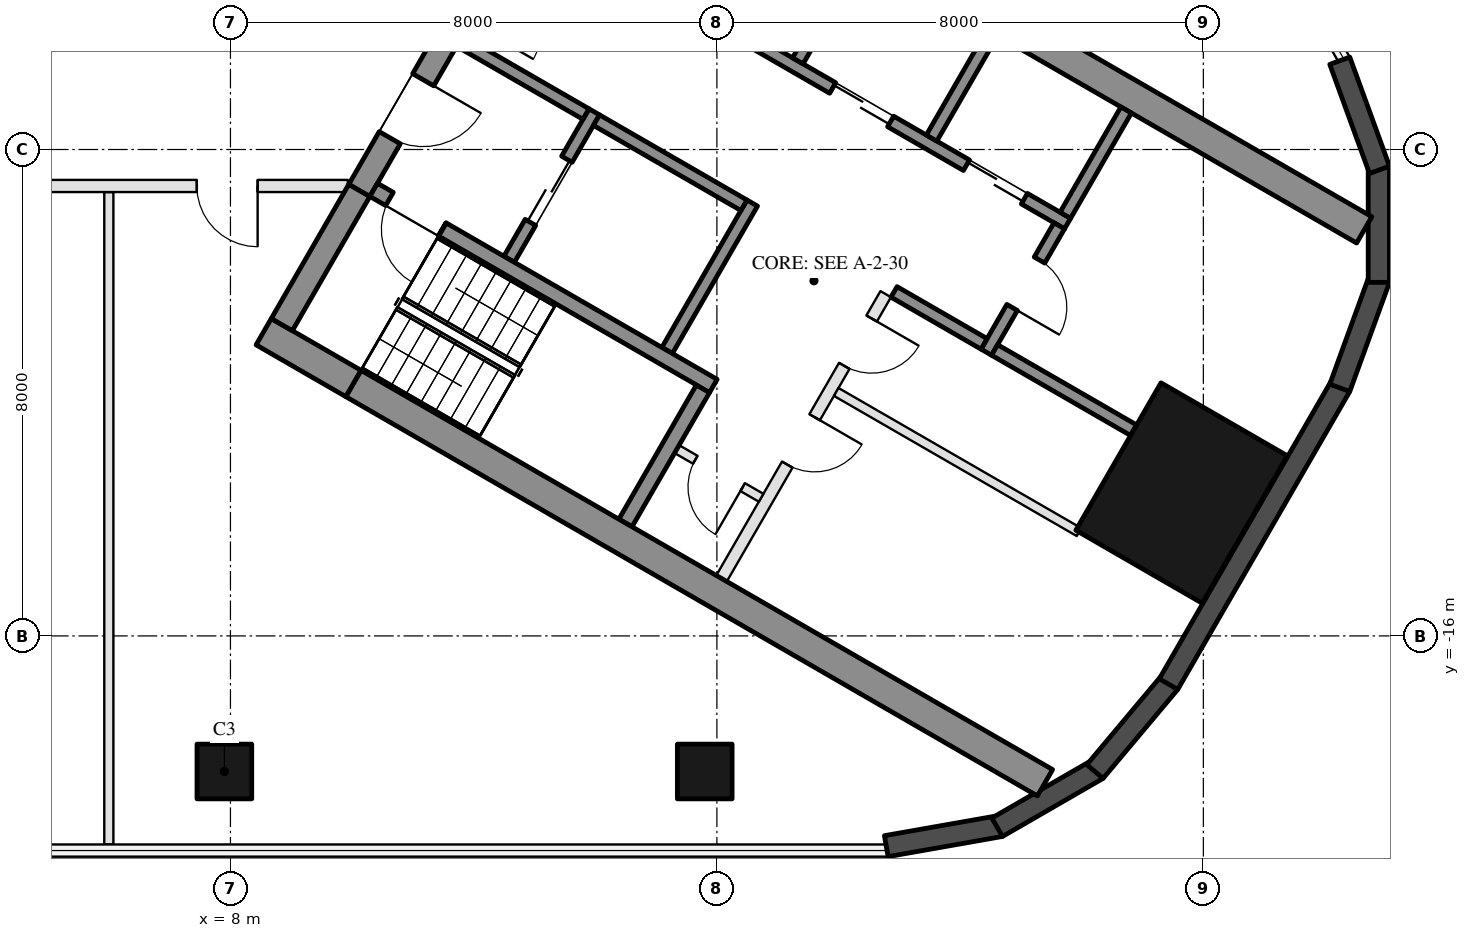
"""IFC4 building model, lengths in metres.
Left out: names, types, materials, properties, quantities, classifications, styles, units other than length and angle.
Written with IfcOpenShell. Run it as: python <this file> out.ifc"""

import sys

from ifc_helpers import new_model, si_unit, direction, frame, frame_2d, origin, origin_2d, place, context, subcontext, project, spatial, rectangle, hollow_rectangle, extrude, element, fill, save


model = new_model("IFC4")
c1 = context("Model", 3, precision=1e-05, world=origin(), true_north=direction((0.0, 1.0)))
c2 = subcontext(c1, "Body", "Model", "MODEL_VIEW")
j1 = project(units=[si_unit("LENGTHUNIT", "METRE"), si_unit("PLANEANGLEUNIT", "RADIAN")], contexts=[c1])
p1 = place(None, origin())
s1 = spatial("IfcSite", under=j1, at=p1, CompositionType="ELEMENT")
p2 = place(p1, origin())
s2 = spatial("IfcBuilding", under=s1, at=p2, CompositionType="ELEMENT")
p3 = place(p2, frame((0.0, 0.0, 131.6)))
s3 = spatial("IfcBuildingStorey", under=s2, at=p3, CompositionType="ELEMENT", Elevation=131.6)
for number, where, z_axis, x_axis in (
    (1, (7.9, -18.23, 0.0), (0.0, 0.0, 1.0), (-1.0, 0.0, 0.0)),
    (2, (15.8, -18.23, 0.0), (0.0, 0.0, 1.0), (-1.0, 0.0, 0.0)),
):
    element("IfcColumn", number, at=place(p3, frame(where, z_axis=z_axis, x_axis=x_axis)), inside=s3, PredefinedType="COLUMN", context=c2, shape_type="SweptSolid", body=[
        extrude(hollow_rectangle(XDim=0.9, YDim=0.9, WallThickness=0.04, at=origin_2d()), origin(), (0.0, 0.0, 1.0), 6.0),
    ])
p4 = place(p3, frame((23.643, -13.65, 0.0), z_axis=(0.0, 0.0, 1.0), x_axis=(0.5, 0.866025403784, 0.0)))
e3 = element("IfcColumn", 3, at=p4, inside=s3, PredefinedType="COLUMN", context=c2, shape_type="SweptSolid", body=[
    extrude(hollow_rectangle(XDim=2.8, YDim=2.4, WallThickness=0.07, at=origin_2d()), origin(), (0.0, 0.0, 1.0), 6.0),
])
p5 = place(p3, frame((18.785, -19.458, 0.0), z_axis=(0.0, 0.0, 1.0), x_axis=(0.984798995425, 0.173697837091, 0.0)))
e4 = element("IfcWall", 4, at=p5, inside=s3, PredefinedType="SOLIDWALL", context=c2, shape_type="SweptSolid", body=[
    extrude(rectangle(XDim=1.91, YDim=0.35, at=frame_2d((0.955, 0.0))), origin(), (0.0, 0.0, 1.0), 5.7),
])
for number, where, z_axis, x_axis in (
    (5, (20.61, -19.147, 0.0), (0.0, 0.0, 1.0), (0.866, 0.5, 0.0)),
    (6, (22.217, -18.231, 0.0), (0.0, 0.0, 1.0), (0.643, 0.766, 0.0)),
):
    element("IfcWall", number, at=place(p3, frame(where, z_axis=z_axis, x_axis=x_axis)), inside=s3, PredefinedType="SOLIDWALL", context=c2, shape_type="SweptSolid", body=[
        extrude(rectangle(XDim=1.91, YDim=0.35, at=frame_2d((0.955, 0.0))), origin(), (0.0, 0.0, 1.0), 5.7),
    ])
p6 = place(p3, frame((23.427, -16.792, 0.0), z_axis=(0.0, 0.0, 1.0), x_axis=(0.499986410639, 0.866033249463, 0.0)))
e7 = element("IfcWall", 7, at=p6, inside=s3, PredefinedType="SOLIDWALL", context=c2, shape_type="SweptSolid", body=[
    extrude(rectangle(XDim=5.658, YDim=0.35, at=frame_2d((2.829, 0.0))), origin(), (0.0, 0.0, 1.0), 5.7),
])
for number, where, z_axis, x_axis in (
    (8, (26.244, -11.92, 0.0), (0.0, 0.0, 1.0), (0.342, 0.94, 0.0)),
    (9, (26.886, -10.185, 0.0), (0.0, 0.0, 1.0), (0.0, 1.0, 0.0)),
    (10, (26.897, -8.335, 0.0), (0.0, 0.0, 1.0), (-0.342, 0.94, 0.0)),
):
    element("IfcWall", number, at=place(p3, frame(where, z_axis=z_axis, x_axis=x_axis)), inside=s3, PredefinedType="SOLIDWALL", context=c2, shape_type="SweptSolid", body=[
        extrude(rectangle(XDim=1.91, YDim=0.35, at=frame_2d((0.955, 0.0))), origin(), (0.0, 0.0, 1.0), 5.7),
    ])
p7 = place(p3, frame((13.797, -1.903, 0.0), z_axis=(0.0, 0.0, 1.0), x_axis=(0.866025009528, -0.500000682871, 0.0)))
e11 = element("IfcWall", 11, at=p7, inside=s3, PredefinedType="SHEAR", context=c2, shape_type="SweptSolid", body=[
    extrude(rectangle(XDim=14.837, YDim=0.5, at=frame_2d((7.418, 0.0))), origin(), (0.0, 0.0, 1.0), 5.7),
])
p8 = place(p3, frame((14.496, -14.143, 0.0), z_axis=(0.0, 0.0, 1.0), x_axis=(0.500062241894, 0.865989465428, 0.0)))
e12 = element("IfcWall", 12, at=p8, inside=s3, PredefinedType="SHEAR", context=c2, shape_type="SweptSolid", body=[
    extrude(rectangle(XDim=2.55, YDim=0.25, at=frame_2d((1.275, 0.0))), origin(), (0.0, 0.0, 1.0), 5.7),
])
p9 = place(p3, frame((15.181, -11.305, 0.0), z_axis=(0.0, 0.0, 1.0), x_axis=(0.49994636267, 0.866056369097, 0.0)))
e13 = element("IfcWall", 13, at=p9, inside=s3, PredefinedType="SHEAR", context=c2, shape_type="SweptSolid", body=[
    extrude(rectangle(XDim=2.8, YDim=0.2, at=frame_2d((1.4, 0.0))), origin(), (0.0, 0.0, 1.0), 5.7),
])
p10 = place(p3, frame((12.583, -9.805, 0.0), z_axis=(0.0, 0.0, 1.0), x_axis=(0.49994636267, 0.866056369097, 0.0)))
e14 = element("IfcWall", 14, at=p10, inside=s3, PredefinedType="SHEAR", context=c2, shape_type="SweptSolid", body=[
    extrude(rectangle(XDim=2.8, YDim=0.2, at=frame_2d((1.4, 0.0))), origin(), (0.0, 0.0, 1.0), 5.7),
])
p11 = place(p10, frame((0.7, 0.0, 0.0)))
e15 = element("IfcOpeningElement", 15, at=p11, cuts=e14, PredefinedType="OPENING", context=c2, shape_type="SweptSolid", body=[
    extrude(rectangle(XDim=1.2, YDim=2.1, at=frame_2d((0.6, 1.05))), frame((0.0, 0.11, 0.0), z_axis=(0.0, -1.0, 0.0), x_axis=(1.0, 0.0, 0.0)), (0.0, 0.0, 1.0), 0.22),
])
p12 = place(p3, frame((11.768, -6.217, 0.0), z_axis=(0.0, 0.0, 1.0), x_axis=(0.866050077142, -0.499957262057, 0.0)))
e16 = element("IfcWall", 16, at=p12, inside=s3, PredefinedType="SHEAR", context=c2, shape_type="SweptSolid", body=[
    extrude(rectangle(XDim=2.4, YDim=0.2, at=frame_2d((1.2, 0.0))), origin(), (0.0, 0.0, 1.0), 5.7),
])
p13 = place(p3, frame((14.02, -7.517, 0.0), z_axis=(0.0, 0.0, 1.0), x_axis=(0.866034573852, -0.49998411664, 0.0)))
e17 = element("IfcWall", 17, at=p13, inside=s3, PredefinedType="SHEAR", context=c2, shape_type="SweptSolid", body=[
    extrude(rectangle(XDim=2.8, YDim=0.2, at=frame_2d((1.4, 0.0))), origin(), (0.0, 0.0, 1.0), 5.7),
])
p14 = place(p3, frame((12.968, -4.138, 0.0), z_axis=(0.0, 0.0, 1.0), x_axis=(0.866028328073, -0.49999493495, 0.0)))
e18 = element("IfcWall", 18, at=p14, inside=s3, PredefinedType="SHEAR", context=c2, shape_type="SweptSolid", body=[
    extrude(rectangle(XDim=10.16, YDim=0.2, at=frame_2d((5.08, 0.0))), origin(), (0.0, 0.0, 1.0), 5.7),
])
p15 = place(p14, frame((0.62, 0.0, 0.0)))
e19 = element("IfcOpeningElement", 19, at=p15, cuts=e18, PredefinedType="OPENING", context=c2, shape_type="SweptSolid", body=[
    extrude(rectangle(XDim=1.1, YDim=2.1, at=frame_2d((0.55, 1.05))), frame((0.0, 0.11, 0.0), z_axis=(0.0, -1.0, 0.0), x_axis=(1.0, 0.0, 0.0)), (0.0, 0.0, 1.0), 0.22),
])
p16 = place(p14, frame((3.16, 0.0, 0.0)))
e20 = element("IfcOpeningElement", 20, at=p16, cuts=e18, PredefinedType="OPENING", context=c2, shape_type="SweptSolid", body=[
    extrude(rectangle(XDim=1.1, YDim=2.1, at=frame_2d((0.55, 1.05))), frame((0.0, 0.11, 0.0), z_axis=(0.0, -1.0, 0.0), x_axis=(1.0, 0.0, 0.0)), (0.0, 0.0, 1.0), 0.22),
])
p17 = place(p14, frame((5.7, 0.0, 0.0)))
e21 = element("IfcOpeningElement", 21, at=p17, cuts=e18, PredefinedType="OPENING", context=c2, shape_type="SweptSolid", body=[
    extrude(rectangle(XDim=1.1, YDim=2.1, at=frame_2d((0.55, 1.05))), frame((0.0, 0.11, 0.0), z_axis=(0.0, -1.0, 0.0), x_axis=(1.0, 0.0, 0.0)), (0.0, 0.0, 1.0), 0.22),
])
p18 = place(p14, frame((8.24, 0.0, 0.0)))
e22 = element("IfcOpeningElement", 22, at=p18, cuts=e18, PredefinedType="OPENING", context=c2, shape_type="SweptSolid", body=[
    extrude(rectangle(XDim=1.1, YDim=2.1, at=frame_2d((0.55, 1.05))), frame((0.0, 0.11, 0.0), z_axis=(0.0, -1.0, 0.0), x_axis=(1.0, 0.0, 0.0)), (0.0, 0.0, 1.0), 0.22),
])
p19 = place(p3, frame((20.43, -11.333, 0.0), z_axis=(0.0, 0.0, 1.0), x_axis=(0.500001309137, 0.866024647952, 0.0)))
e23 = element("IfcWall", 23, at=p19, inside=s3, PredefinedType="SHEAR", context=c2, shape_type="SweptSolid", body=[
    extrude(rectangle(XDim=2.4, YDim=0.2, at=frame_2d((1.2, 0.0))), origin(), (0.0, 0.0, 1.0), 5.7),
])
p20 = place(p19, frame((0.85, 0.0, 0.0)))
e24 = element("IfcOpeningElement", 24, at=p20, cuts=e23, PredefinedType="OPENING", context=c2, shape_type="SweptSolid", body=[
    extrude(rectangle(XDim=0.9, YDim=2.1, at=frame_2d((0.45, 1.05))), frame((0.0, 0.11, 0.0), z_axis=(0.0, -1.0, 0.0), x_axis=(1.0, 0.0, 0.0)), (0.0, 0.0, 1.0), 0.22),
])
p21 = place(p3, frame((18.913, -10.342, 0.0), z_axis=(0.0, 0.0, 1.0), x_axis=(0.866038183914, -0.499977863513, 0.0)))
e25 = element("IfcWall", 25, at=p21, inside=s3, PredefinedType="SHEAR", context=c2, shape_type="SweptSolid", body=[
    extrude(rectangle(XDim=1.71, YDim=0.2, at=frame_2d((0.855, 0.0))), origin(), (0.0, 0.0, 1.0), 5.7),
])
for number, where, z_axis, x_axis in (
    (26, (17.331, -6.542, 0.0), (0.0, 0.0, 1.0), (0.5, 0.866, 0.0)),
    (27, (19.531, -7.812, 0.0), (0.0, 0.0, 1.0), (0.5, 0.866, 0.0)),
    (28, (21.73, -9.082, 0.0), (0.0, 0.0, 1.0), (0.5, 0.866, 0.0)),
):
    element("IfcWall", number, at=place(p3, frame(where, z_axis=z_axis, x_axis=x_axis)), inside=s3, PredefinedType="SHEAR", context=c2, shape_type="SweptSolid", body=[
        extrude(rectangle(XDim=2.0, YDim=0.2, at=frame_2d((1.0, 0.0))), origin(), (0.0, 0.0, 1.0), 5.7),
    ])
p22 = place(p3, frame((20.567, -11.297, 0.0), z_axis=(0.0, 0.0, 1.0), x_axis=(0.866060851709, -0.499938597367, 0.0)))
e29 = element("IfcWall", 29, at=p22, inside=s3, PredefinedType="SHEAR", context=c2, shape_type="SweptSolid", body=[
    extrude(rectangle(XDim=2.64, YDim=0.2, at=frame_2d((1.32, 0.0))), origin(), (0.0, 0.0, 1.0), 5.7),
])
p23 = place(p3, frame((16.076, -15.055, 0.0), z_axis=(0.0, 0.0, 1.0), x_axis=(0.499995103361, 0.866028230842, 0.0)))
e30 = element("IfcWall", 30, at=p23, inside=s3, PredefinedType="PARTITIONING", context=c2, shape_type="SweptSolid", body=[
    extrude(rectangle(XDim=5.4, YDim=0.2, at=frame_2d((2.7, 0.0))), origin(), (0.0, 0.0, 1.0), 5.7),
])
p24 = place(p23, frame((2.163, 0.0, 0.0)))
e31 = element("IfcOpeningElement", 31, at=p24, cuts=e30, PredefinedType="OPENING", context=c2, shape_type="SweptSolid", body=[
    extrude(rectangle(XDim=0.9, YDim=2.1, at=frame_2d((0.45, 1.05))), frame((0.0, 0.11, 0.0), z_axis=(0.0, -1.0, 0.0), x_axis=(1.0, 0.0, 0.0)), (0.0, 0.0, 1.0), 0.22),
])
p25 = place(p23, frame((4.038, 0.0, 0.0)))
e32 = element("IfcOpeningElement", 32, at=p25, cuts=e30, PredefinedType="OPENING", context=c2, shape_type="SweptSolid", body=[
    extrude(rectangle(XDim=0.9, YDim=2.1, at=frame_2d((0.45, 1.05))), frame((0.0, 0.11, 0.0), z_axis=(0.0, -1.0, 0.0), x_axis=(1.0, 0.0, 0.0)), (0.0, 0.0, 1.0), 0.22),
])
p26 = place(p3, frame((15.342, -12.928, 0.0), z_axis=(0.0, 0.0, 1.0), x_axis=(0.865989903783, -0.500061482766, 0.0)))
e33 = element("IfcWall", 33, at=p26, inside=s3, PredefinedType="PARTITIONING", context=c2, shape_type="SweptSolid", body=[
    extrude(rectangle(XDim=1.6, YDim=0.15, at=frame_2d((0.8, 0.0))), origin(), (0.0, 0.0, 1.0), 5.7),
])
p27 = place(p26, frame((0.35, 0.0, 0.0)))
e34 = element("IfcOpeningElement", 34, at=p27, cuts=e33, PredefinedType="OPENING", context=c2, shape_type="SweptSolid", body=[
    extrude(rectangle(XDim=0.9, YDim=2.1, at=frame_2d((0.45, 1.05))), frame((0.0, 0.085, 0.0), z_axis=(0.0, -1.0, 0.0), x_axis=(1.0, 0.0, 0.0)), (0.0, 0.0, 1.0), 0.17),
])
p28 = place(p3, frame((17.963, -11.987, 0.0), z_axis=(0.0, 0.0, 1.0), x_axis=(0.865998608524, -0.500046407882, 0.0)))
e35 = element("IfcWall", 35, at=p28, inside=s3, PredefinedType="PARTITIONING", context=c2, shape_type="SweptSolid", body=[
    extrude(rectangle(XDim=4.61, YDim=0.15, at=frame_2d((2.305, 0.0))), origin(), (0.0, 0.0, 1.0), 5.7),
])
p29 = place(p3, frame((8.547, -10.997, 0.0), z_axis=(0.0, 0.0, 1.0), x_axis=(0.866033076574, -0.499986710104, 0.0)))
e36 = element("IfcWall", 36, at=p29, inside=s3, PredefinedType="SHEAR", context=c2, shape_type="SweptSolid", body=[
    extrude(rectangle(XDim=1.706, YDim=0.5, at=frame_2d((0.853, 0.0))), origin(), (0.0, 0.0, 1.0), 5.7),
])
p30 = place(p3, frame((10.024, -11.85, 0.0), z_axis=(0.0, 0.0, 1.0), x_axis=(0.86602396135, -0.500002498361, 0.0)))
e37 = element("IfcWall", 37, at=p30, inside=s3, PredefinedType="SHEAR", context=c2, shape_type="SweptSolid", body=[
    extrude(rectangle(XDim=13.131, YDim=0.5, at=frame_2d((6.565, 0.0))), origin(), (0.0, 0.0, 1.0), 5.7),
])
p31 = place(p3, frame((8.845, -10.88, 0.0), z_axis=(0.0, 0.0, 1.0), x_axis=(0.499990435942, 0.866030925526, 0.0)))
e38 = element("IfcWall", 38, at=p31, inside=s3, PredefinedType="SHEAR", context=c2, shape_type="SweptSolid", body=[
    extrude(rectangle(XDim=2.55, YDim=0.4, at=frame_2d((1.275, 0.0))), origin(), (0.0, 0.0, 1.0), 5.7),
])
p32 = place(p3, frame((10.12, -8.672, 0.0), z_axis=(0.0, 0.0, 1.0), x_axis=(0.500008956979, 0.866020232408, 0.0)))
e39 = element("IfcWall", 39, at=p32, inside=s3, PredefinedType="SHEAR", context=c2, shape_type="SweptSolid", body=[
    extrude(rectangle(XDim=7.45, YDim=0.4, at=frame_2d((3.725, 0.0))), origin(), (0.0, 0.0, 1.0), 5.7),
])
p33 = place(p32, frame((1.0, 0.0, 0.0)))
e40 = element("IfcOpeningElement", 40, at=p33, cuts=e39, PredefinedType="OPENING", context=c2, shape_type="SweptSolid", body=[
    extrude(rectangle(XDim=1.1, YDim=2.1, at=frame_2d((0.55, 1.05))), frame((0.0, 0.21, 0.0), z_axis=(0.0, -1.0, 0.0), x_axis=(1.0, 0.0, 0.0)), (0.0, 0.0, 1.0), 0.42),
])
p34 = place(p32, frame((3.3, 0.0, 0.0)))
e41 = element("IfcOpeningElement", 41, at=p34, cuts=e39, PredefinedType="OPENING", context=c2, shape_type="SweptSolid", body=[
    extrude(rectangle(XDim=1.4, YDim=2.1, at=frame_2d((0.7, 1.05))), frame((0.0, 0.21, 0.0), z_axis=(0.0, -1.0, 0.0), x_axis=(1.0, 0.0, 0.0)), (0.0, 0.0, 1.0), 0.42),
])
p35 = place(p3, frame((10.356, -8.664, 0.0), z_axis=(0.0, 0.0, 1.0), x_axis=(0.866095317631, -0.499878886109, 0.0)))
e42 = element("IfcWall", 42, at=p35, inside=s3, PredefinedType="SHEAR", context=c2, shape_type="SweptSolid", body=[
    extrude(rectangle(XDim=1.306, YDim=0.25, at=frame_2d((0.653, 0.0))), origin(), (0.0, 0.0, 1.0), 5.7),
])
p36 = place(p35, frame((0.3, 0.0, 0.0)))
e43 = element("IfcOpeningElement", 43, at=p36, cuts=e42, PredefinedType="OPENING", context=c2, shape_type="SweptSolid", body=[
    extrude(rectangle(XDim=1.0, YDim=2.1, at=frame_2d((0.5, 1.05))), frame((0.0, 0.135, 0.0), z_axis=(0.0, -1.0, 0.0), x_axis=(1.0, 0.0, 0.0)), (0.0, 0.0, 1.0), 0.27),
])
p37 = place(p3, frame((11.487, -9.316, 0.0), z_axis=(0.0, 0.0, 1.0), x_axis=(0.866011695431, -0.500023742813, 0.0)))
e44 = element("IfcWall", 44, at=p37, inside=s3, PredefinedType="SHEAR", context=c2, shape_type="SweptSolid", body=[
    extrude(rectangle(XDim=5.144, YDim=0.25, at=frame_2d((2.572, 0.0))), origin(), (0.0, 0.0, 1.0), 5.7),
])
p38 = place(p3, frame((6.0, -19.43, 0.0), z_axis=(0.0, 0.0, 1.0), x_axis=(0.0, 1.0, 0.0)))
e45 = element("IfcWall", 45, at=p38, inside=s3, PredefinedType="PARTITIONING", context=c2, shape_type="SweptSolid", body=[
    extrude(rectangle(XDim=10.73, YDim=0.15, at=frame_2d((5.365, 0.0))), origin(), (0.0, 0.0, 1.0), 5.7),
])
p39 = place(p3, frame((-9.93, -8.6, 0.0), z_axis=(0.0, 0.0, 1.0), x_axis=(1.0, 0.0, 0.0)))
e46 = element("IfcWall", 46, at=p39, inside=s3, PredefinedType="PARTITIONING", context=c2, shape_type="SweptSolid", body=[
    extrude(rectangle(XDim=19.861, YDim=0.2, at=frame_2d((9.93, 0.0))), origin(), (0.0, 0.0, 1.0), 4.91),
])
p40 = place(p39, frame((1.384, 0.0, 0.0)))
e47 = element("IfcOpeningElement", 47, at=p40, cuts=e46, PredefinedType="OPENING", context=c2, shape_type="SweptSolid", body=[
    extrude(rectangle(XDim=1.2, YDim=2.1, at=frame_2d((0.6, 1.05))), frame((0.0, 0.11, 0.0), z_axis=(0.0, -1.0, 0.0), x_axis=(1.0, 0.0, 0.0)), (0.0, 0.0, 1.0), 0.22),
])
p41 = place(p39, frame((6.012, 0.0, 0.0)))
e48 = element("IfcOpeningElement", 48, at=p41, cuts=e46, PredefinedType="OPENING", context=c2, shape_type="SweptSolid", body=[
    extrude(rectangle(XDim=1.8, YDim=2.4, at=frame_2d((0.9, 1.2))), frame((0.0, 0.11, 0.0), z_axis=(0.0, -1.0, 0.0), x_axis=(1.0, 0.0, 0.0)), (0.0, 0.0, 1.0), 0.22),
])
p42 = place(p39, frame((12.049, 0.0, 0.0)))
e49 = element("IfcOpeningElement", 49, at=p42, cuts=e46, PredefinedType="OPENING", context=c2, shape_type="SweptSolid", body=[
    extrude(rectangle(XDim=1.8, YDim=2.4, at=frame_2d((0.9, 1.2))), frame((0.0, 0.11, 0.0), z_axis=(0.0, -1.0, 0.0), x_axis=(1.0, 0.0, 0.0)), (0.0, 0.0, 1.0), 0.22),
])
p43 = place(p39, frame((17.377, 0.0, 0.0)))
e50 = element("IfcOpeningElement", 50, at=p43, cuts=e46, PredefinedType="OPENING", context=c2, shape_type="SweptSolid", body=[
    extrude(rectangle(XDim=1.0, YDim=2.1, at=frame_2d((0.5, 1.05))), frame((0.0, 0.11, 0.0), z_axis=(0.0, -1.0, 0.0), x_axis=(1.0, 0.0, 0.0)), (0.0, 0.0, 1.0), 0.22),
])
p44 = place(p11, origin())
e51 = element("IfcDoor", 51, at=p44, inside=s3, OperationType="DOUBLE_DOOR_SLIDING", PredefinedType="DOOR", context=c2, shape_type="SweptSolid", body=[
    extrude(rectangle(XDim=1.2, YDim=2.1, at=frame_2d((0.6, 1.05))), frame((0.0, 0.025, 0.0), z_axis=(0.0, -1.0, 0.0), x_axis=(1.0, 0.0, 0.0)), (0.0, 0.0, 1.0), 0.05),
])
fill(e15, e51)
p45 = place(p27, frame((0.9, 0.0, 0.0), z_axis=(0.0, 0.0, 1.0), x_axis=(-1.0, 0.0, 0.0)))
e52 = element("IfcDoor", 52, at=p45, inside=s3, OperationType="SINGLE_SWING_LEFT", PredefinedType="DOOR", context=c2, shape_type="SweptSolid", body=[
    extrude(rectangle(XDim=0.9, YDim=2.1, at=frame_2d((0.45, 1.05))), frame((0.0, 0.025, 0.0), z_axis=(0.0, -1.0, 0.0), x_axis=(1.0, 0.0, 0.0)), (0.0, 0.0, 1.0), 0.05),
])
fill(e34, e52)
p46 = place(p17, origin())
e53 = element("IfcDoor", 53, at=p46, inside=s3, OperationType="DOUBLE_DOOR_SLIDING", PredefinedType="DOOR", context=c2, shape_type="SweptSolid", body=[
    extrude(rectangle(XDim=1.1, YDim=2.1, at=frame_2d((0.55, 1.05))), frame((0.0, 0.025, 0.0), z_axis=(0.0, -1.0, 0.0), x_axis=(1.0, 0.0, 0.0)), (0.0, 0.0, 1.0), 0.05),
])
fill(e21, e53)
p47 = place(p18, origin())
e54 = element("IfcDoor", 54, at=p47, inside=s3, OperationType="DOUBLE_DOOR_SLIDING", PredefinedType="DOOR", context=c2, shape_type="SweptSolid", body=[
    extrude(rectangle(XDim=1.1, YDim=2.1, at=frame_2d((0.55, 1.05))), frame((0.0, 0.025, 0.0), z_axis=(0.0, -1.0, 0.0), x_axis=(1.0, 0.0, 0.0)), (0.0, 0.0, 1.0), 0.05),
])
fill(e22, e54)
p48 = place(p20, frame((0.9, 0.0, 0.0), z_axis=(0.0, 0.0, 1.0), x_axis=(-1.0, 0.0, 0.0)))
e55 = element("IfcDoor", 55, at=p48, inside=s3, OperationType="SINGLE_SWING_RIGHT", PredefinedType="DOOR", context=c2, shape_type="SweptSolid", body=[
    extrude(rectangle(XDim=0.9, YDim=2.1, at=frame_2d((0.45, 1.05))), frame((0.0, 0.025, 0.0), z_axis=(0.0, -1.0, 0.0), x_axis=(1.0, 0.0, 0.0)), (0.0, 0.0, 1.0), 0.05),
])
fill(e24, e55)
p49 = place(p24, frame((0.9, 0.0, 0.0), z_axis=(0.0, 0.0, 1.0), x_axis=(-1.0, 0.0, 0.0)))
e56 = element("IfcDoor", 56, at=p49, inside=s3, OperationType="SINGLE_SWING_LEFT", PredefinedType="DOOR", context=c2, shape_type="SweptSolid", body=[
    extrude(rectangle(XDim=0.9, YDim=2.1, at=frame_2d((0.45, 1.05))), frame((0.0, 0.025, 0.0), z_axis=(0.0, -1.0, 0.0), x_axis=(1.0, 0.0, 0.0)), (0.0, 0.0, 1.0), 0.05),
])
fill(e31, e56)
p50 = place(p25, frame((0.9, 0.0, 0.0), z_axis=(0.0, 0.0, 1.0), x_axis=(-1.0, 0.0, 0.0)))
e57 = element("IfcDoor", 57, at=p50, inside=s3, OperationType="SINGLE_SWING_LEFT", PredefinedType="DOOR", context=c2, shape_type="SweptSolid", body=[
    extrude(rectangle(XDim=0.9, YDim=2.1, at=frame_2d((0.45, 1.05))), frame((0.0, 0.025, 0.0), z_axis=(0.0, -1.0, 0.0), x_axis=(1.0, 0.0, 0.0)), (0.0, 0.0, 1.0), 0.05),
])
fill(e32, e57)
p51 = place(p33, frame((1.1, 0.0, 0.0), z_axis=(0.0, 0.0, 1.0), x_axis=(-1.0, 0.0, 0.0)))
e58 = element("IfcDoor", 58, at=p51, inside=s3, OperationType="SINGLE_SWING_LEFT", PredefinedType="DOOR", context=c2, shape_type="SweptSolid", body=[
    extrude(rectangle(XDim=1.1, YDim=2.1, at=frame_2d((0.55, 1.05))), frame((0.0, 0.025, 0.0), z_axis=(0.0, -1.0, 0.0), x_axis=(1.0, 0.0, 0.0)), (0.0, 0.0, 1.0), 0.05),
])
fill(e40, e58)
p52 = place(p36, frame((1.0, 0.0, 0.0), z_axis=(0.0, 0.0, 1.0), x_axis=(-1.0, 0.0, 0.0)))
e59 = element("IfcDoor", 59, at=p52, inside=s3, OperationType="SINGLE_SWING_LEFT", PredefinedType="DOOR", context=c2, shape_type="SweptSolid", body=[
    extrude(rectangle(XDim=1.0, YDim=2.1, at=frame_2d((0.5, 1.05))), frame((0.0, 0.025, 0.0), z_axis=(0.0, -1.0, 0.0), x_axis=(1.0, 0.0, 0.0)), (0.0, 0.0, 1.0), 0.05),
])
fill(e43, e59)
p53 = place(p43, frame((1.0, 0.0, 0.0), z_axis=(0.0, 0.0, 1.0), x_axis=(-1.0, 0.0, 0.0)))
e60 = element("IfcDoor", 60, at=p53, inside=s3, OperationType="SINGLE_SWING_LEFT", PredefinedType="DOOR", context=c2, shape_type="SweptSolid", body=[
    extrude(rectangle(XDim=1.0, YDim=2.1, at=frame_2d((0.5, 1.05))), frame((0.0, 0.025, 0.0), z_axis=(0.0, -1.0, 0.0), x_axis=(1.0, 0.0, 0.0)), (0.0, 0.0, 1.0), 0.05),
])
fill(e50, e60)
save(model, sys.argv[1])
